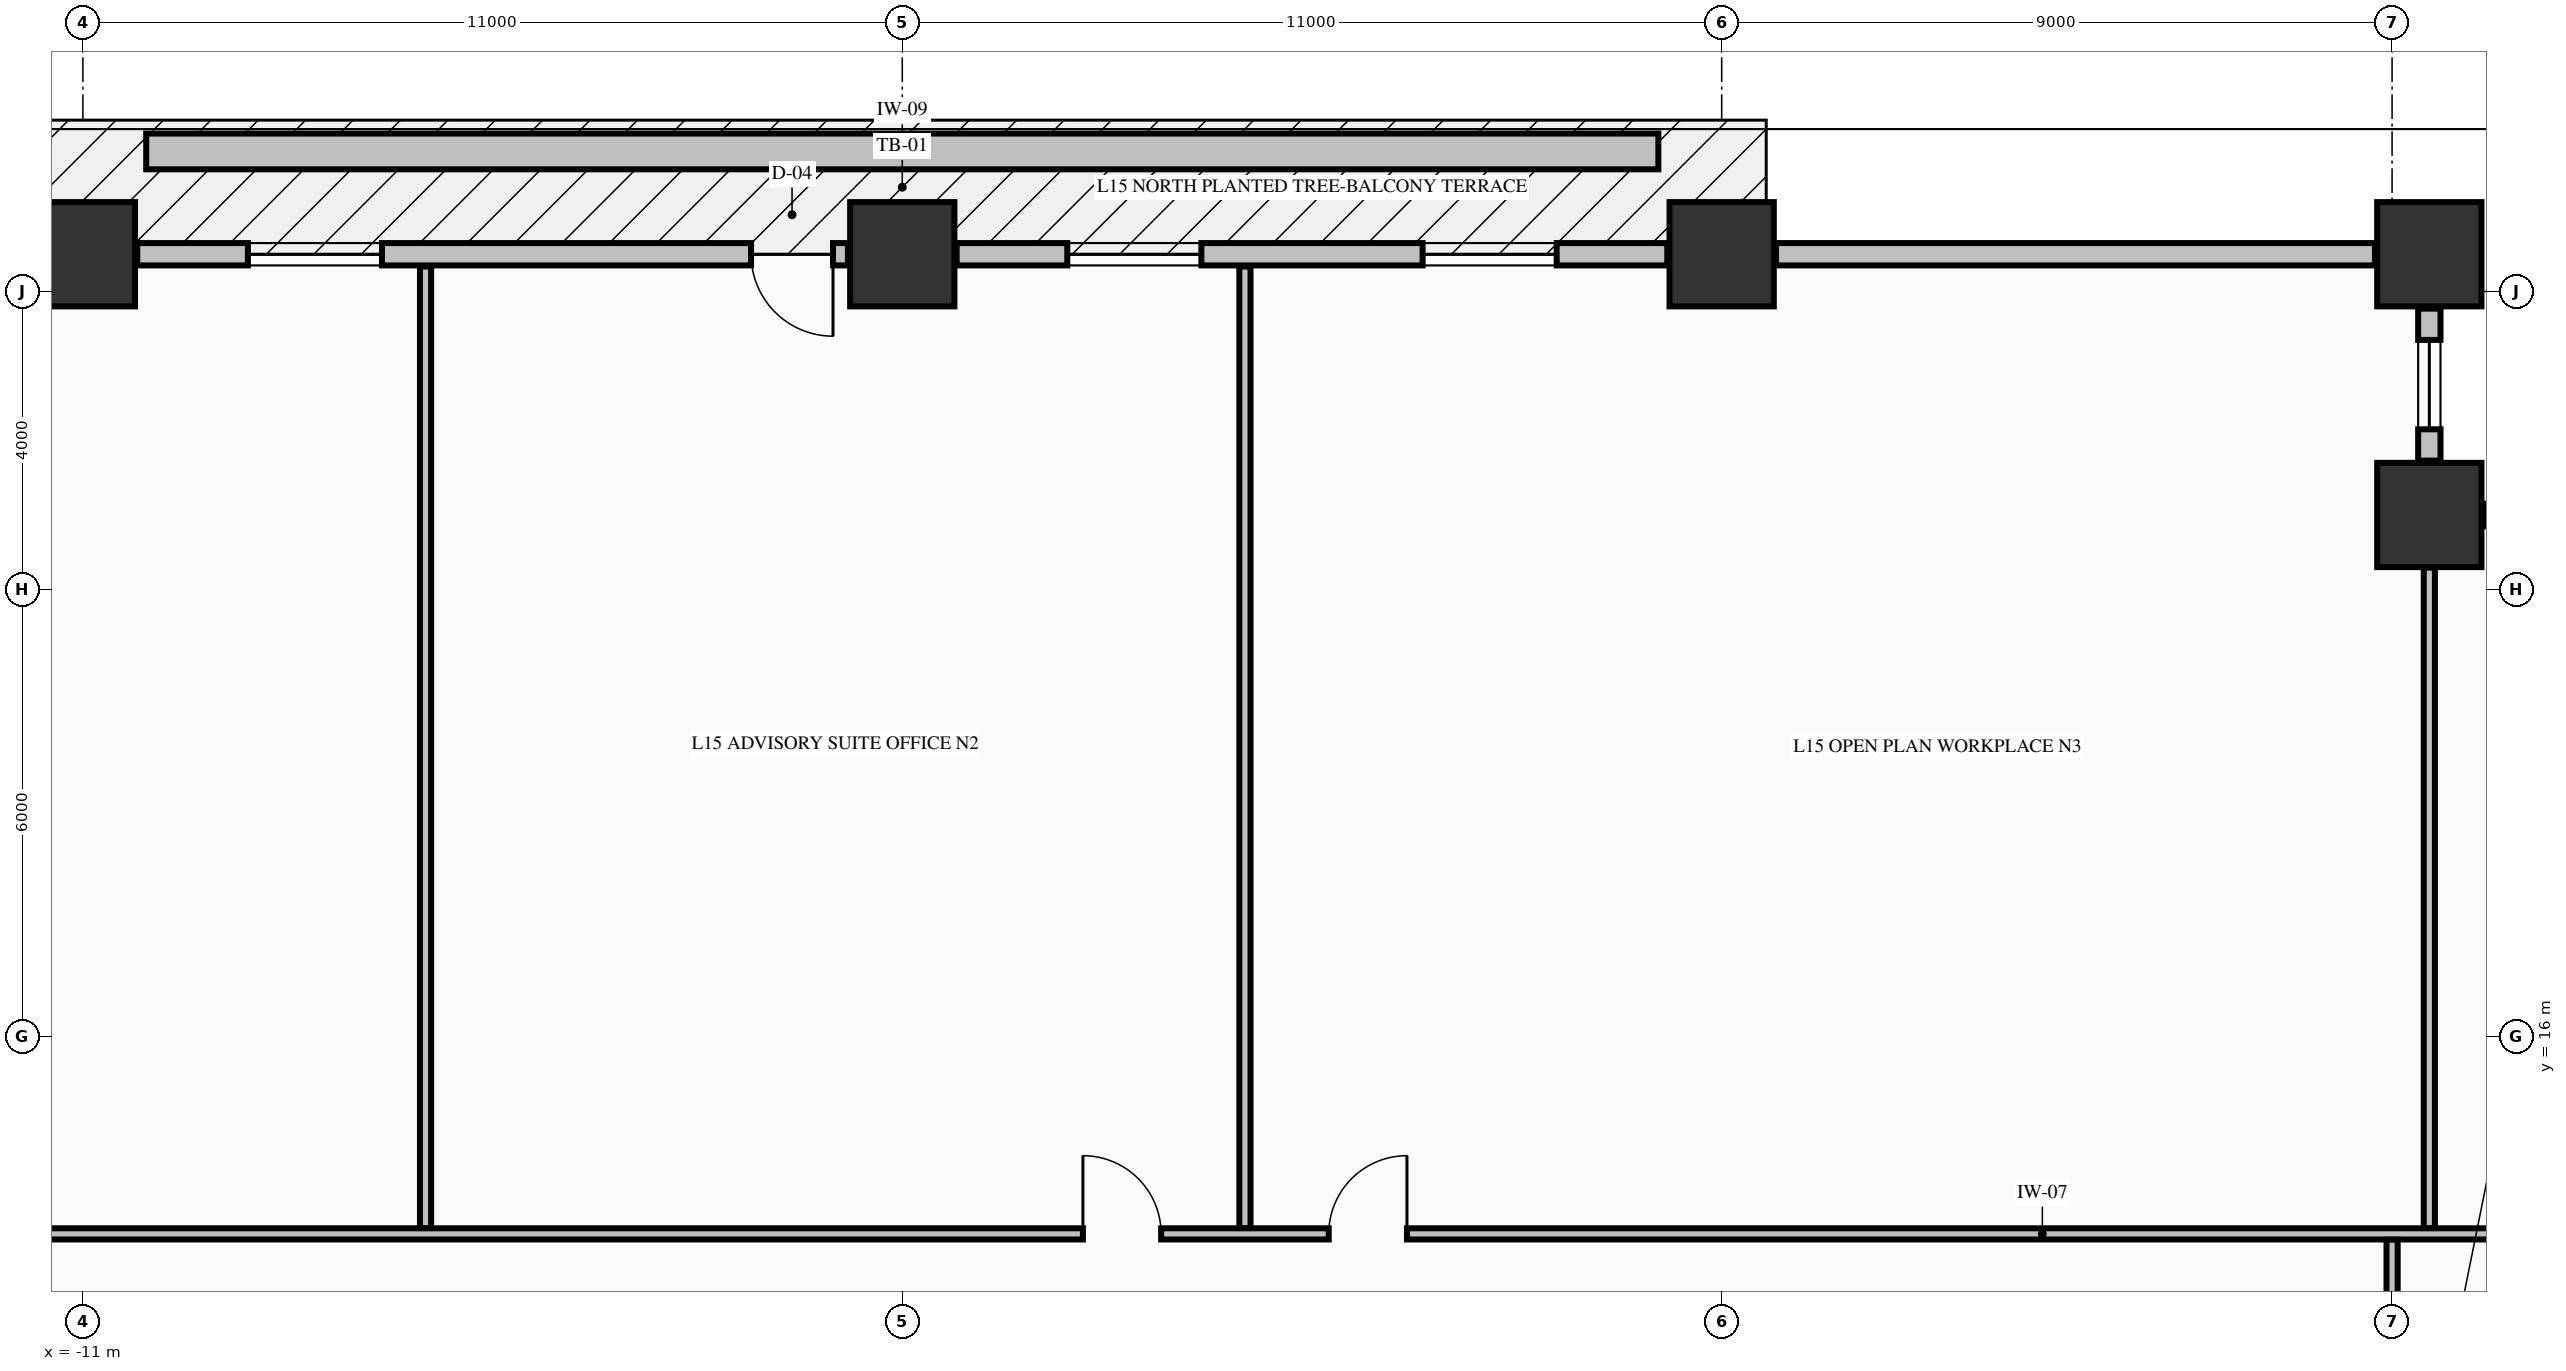
"""IFC4 building model, lengths in metres.
Left out: names, types, materials, properties, quantities, classifications, styles, units other than length and angle.
Written with IfcOpenShell. Run it as: python <this file> out.ifc"""

import sys

from ifc_helpers import new_model, si_unit, direction, frame, frame_2d, origin, origin_2d, place, context, subcontext, project, spatial, rectangle, extrude, element, fill, save


model = new_model("IFC4")
c1 = context("Model", 3, precision=1e-05, world=origin(), true_north=direction((0.0, 1.0)))
c2 = subcontext(c1, "Body", "Model", "MODEL_VIEW")
j1 = project(units=[si_unit("LENGTHUNIT", "METRE"), si_unit("PLANEANGLEUNIT", "RADIAN")], contexts=[c1])
p1 = place(None, origin())
s1 = spatial("IfcSite", under=j1, at=p1, CompositionType="ELEMENT")
p2 = place(p1, origin())
s2 = spatial("IfcBuilding", under=s1, at=p2, CompositionType="ELEMENT")
p3 = place(p2, frame((0.0, 0.0, 64.33)))
s3 = spatial("IfcBuildingStorey", under=s2, at=p3, CompositionType="ELEMENT", Elevation=64.33)
for number, where, z_axis, x_axis in (
    (1, (-11.0, 26.5, -0.25), (0.0, 0.0, 1.0), (1.0, 0.0, 0.0)),
    (2, (0.0, 26.5, -0.25), (0.0, 0.0, 1.0), (1.0, 0.0, 0.0)),
    (3, (11.0, 26.5, -0.25), (0.0, 0.0, 1.0), (1.0, 0.0, 0.0)),
    (4, (20.5, 26.5, -0.25), (0.0, 0.0, 1.0), (1.0, 0.0, 0.0)),
    (5, (20.5, 23.0, -0.25), (0.0, 0.0, 1.0), (1.0, 0.0, 0.0)),
):
    element("IfcColumn", number, at=place(p3, frame(where, z_axis=z_axis, x_axis=x_axis)), inside=s3, PredefinedType="COLUMN", context=c2, shape_type="SweptSolid", body=[
        extrude(rectangle(XDim=1.4, YDim=1.4, at=origin_2d()), origin(), (0.0, 0.0, 1.0), 3.57),
    ])
p4 = place(p3, frame((23.27, 23.0, 0.0), z_axis=(0.0, 0.0, 1.0), x_axis=(-1.0, 0.0, 0.0)))
e6 = element("IfcWall", 6, at=p4, inside=s3, PredefinedType="STANDARD", context=c2, shape_type="SweptSolid", body=[
    extrude(rectangle(XDim=2.04, YDim=0.3, at=frame_2d((1.02, 0.0))), origin(), (0.0, 0.0, 1.0), 2.712),
])
p5 = place(p4, frame((0.42, 0.0, 0.82)))
e7 = element("IfcOpeningElement", 7, at=p5, cuts=e6, PredefinedType="OPENING", context=c2, shape_type="SweptSolid", body=[
    extrude(rectangle(XDim=1.2, YDim=1.65, at=frame_2d((0.6, 0.825))), frame((0.0, 0.16, 0.0), z_axis=(0.0, -1.0, 0.0), x_axis=(1.0, 0.0, 0.0)), (0.0, 0.0, 1.0), 0.32),
])
p6 = place(p3, frame((20.5, 23.73, 0.0), z_axis=(0.0, 0.0, 1.0), x_axis=(0.0, 1.0, 0.0)))
e8 = element("IfcWall", 8, at=p6, inside=s3, PredefinedType="STANDARD", context=c2, shape_type="SweptSolid", body=[
    extrude(rectangle(XDim=2.04, YDim=0.3, at=frame_2d((1.02, 0.0))), origin(), (0.0, 0.0, 1.0), 2.712),
])
p7 = place(p6, frame((0.42, 0.0, 0.82)))
e9 = element("IfcOpeningElement", 9, at=p7, cuts=e8, PredefinedType="OPENING", context=c2, shape_type="SweptSolid", body=[
    extrude(rectangle(XDim=1.2, YDim=1.65, at=frame_2d((0.6, 0.825))), frame((0.0, 0.16, 0.0), z_axis=(0.0, -1.0, 0.0), x_axis=(1.0, 0.0, 0.0)), (0.0, 0.0, 1.0), 0.32),
])
p8 = place(p3, frame((-0.73, 26.5, 0.0), z_axis=(0.0, 0.0, 1.0), x_axis=(-1.0, 0.0, 0.0)))
e10 = element("IfcWall", 10, at=p8, inside=s3, PredefinedType="STANDARD", context=c2, shape_type="SweptSolid", body=[
    extrude(rectangle(XDim=9.54, YDim=0.3, at=frame_2d((4.77, 0.0))), origin(), (0.0, 0.0, 1.0), 2.712),
])
p9 = place(p8, frame((0.2, 0.0, 0.0)))
e11 = element("IfcOpeningElement", 11, at=p9, cuts=e10, PredefinedType="OPENING", context=c2, shape_type="SweptSolid", body=[
    extrude(rectangle(XDim=1.1, YDim=2.15, at=frame_2d((0.55, 1.075))), frame((0.0, 0.16, 0.0), z_axis=(0.0, -1.0, 0.0), x_axis=(1.0, 0.0, 0.0)), (0.0, 0.0, 1.0), 0.32),
])
p10 = place(p8, frame((6.255, 0.0, 0.78)))
e12 = element("IfcOpeningElement", 12, at=p10, cuts=e10, PredefinedType="OPENING", context=c2, shape_type="SweptSolid", body=[
    extrude(rectangle(XDim=1.8, YDim=1.72, at=frame_2d((0.9, 0.86))), frame((0.0, 0.16, 0.0), z_axis=(0.0, -1.0, 0.0), x_axis=(1.0, 0.0, 0.0)), (0.0, 0.0, 1.0), 0.32),
])
p11 = place(p3, frame((10.27, 26.5, 0.0), z_axis=(0.0, 0.0, 1.0), x_axis=(-1.0, 0.0, 0.0)))
e13 = element("IfcWall", 13, at=p11, inside=s3, PredefinedType="STANDARD", context=c2, shape_type="SweptSolid", body=[
    extrude(rectangle(XDim=9.54, YDim=0.3, at=frame_2d((4.77, 0.0))), origin(), (0.0, 0.0, 1.0), 2.712),
])
p12 = place(p11, frame((1.485, 0.0, 0.78)))
e14 = element("IfcOpeningElement", 14, at=p12, cuts=e13, PredefinedType="OPENING", context=c2, shape_type="SweptSolid", body=[
    extrude(rectangle(XDim=1.8, YDim=1.72, at=frame_2d((0.9, 0.86))), frame((0.0, 0.16, 0.0), z_axis=(0.0, -1.0, 0.0), x_axis=(1.0, 0.0, 0.0)), (0.0, 0.0, 1.0), 0.32),
])
p13 = place(p11, frame((6.255, 0.0, 0.78)))
e15 = element("IfcOpeningElement", 15, at=p13, cuts=e13, PredefinedType="OPENING", context=c2, shape_type="SweptSolid", body=[
    extrude(rectangle(XDim=1.8, YDim=1.72, at=frame_2d((0.9, 0.86))), frame((0.0, 0.16, 0.0), z_axis=(0.0, -1.0, 0.0), x_axis=(1.0, 0.0, 0.0)), (0.0, 0.0, 1.0), 0.32),
])
p14 = place(p3, frame((19.77, 26.5, 0.0), z_axis=(0.0, 0.0, 1.0), x_axis=(-1.0, 0.0, 0.0)))
e16 = element("IfcWall", 16, at=p14, inside=s3, PredefinedType="STANDARD", context=c2, shape_type="SweptSolid", body=[
    extrude(rectangle(XDim=8.04, YDim=0.3, at=frame_2d((4.02, 0.0))), origin(), (0.0, 0.0, 1.0), 2.712),
])
p15 = place(p3, frame((-28.835, 13.35, 0.0), z_axis=(0.0, 0.0, 1.0), x_axis=(1.0, 0.0, 0.0)))
e17 = element("IfcWall", 17, at=p15, inside=s3, PredefinedType="PARTITIONING", context=c2, shape_type="SweptSolid", body=[
    extrude(rectangle(XDim=52.67, YDim=0.15, at=frame_2d((26.335, 0.0))), origin(), (0.0, 0.0, 1.0), 3.32),
])
p16 = place(p15, frame((15.21, 0.0, 0.0)))
e18 = element("IfcOpeningElement", 18, at=p16, cuts=e17, PredefinedType="OPENING", context=c2, shape_type="SweptSolid", body=[
    extrude(rectangle(XDim=1.05, YDim=2.15, at=frame_2d((0.525, 1.075))), frame((0.0, 0.085, 0.0), z_axis=(0.0, -1.0, 0.0), x_axis=(1.0, 0.0, 0.0)), (0.0, 0.0, 1.0), 0.17),
])
p17 = place(p15, frame((31.26, 0.0, 0.0)))
e19 = element("IfcOpeningElement", 19, at=p17, cuts=e17, PredefinedType="OPENING", context=c2, shape_type="SweptSolid", body=[
    extrude(rectangle(XDim=1.05, YDim=2.15, at=frame_2d((0.525, 1.075))), frame((0.0, 0.085, 0.0), z_axis=(0.0, -1.0, 0.0), x_axis=(1.0, 0.0, 0.0)), (0.0, 0.0, 1.0), 0.17),
])
p18 = place(p15, frame((34.56, 0.0, 0.0)))
e20 = element("IfcOpeningElement", 20, at=p18, cuts=e17, PredefinedType="OPENING", context=c2, shape_type="SweptSolid", body=[
    extrude(rectangle(XDim=1.05, YDim=2.15, at=frame_2d((0.525, 1.075))), frame((0.0, 0.085, 0.0), z_axis=(0.0, -1.0, 0.0), x_axis=(1.0, 0.0, 0.0)), (0.0, 0.0, 1.0), 0.17),
])
for number, where, z_axis, x_axis in (
    (21, (-6.4, 13.428, 0.0), (0.0, 0.0, 1.0), (0.0, 1.0, 0.0)),
    (22, (4.6, 13.428, 0.0), (0.0, 0.0, 1.0), (0.0, 1.0, 0.0)),
):
    element("IfcWall", number, at=place(p3, frame(where, z_axis=z_axis, x_axis=x_axis)), inside=s3, PredefinedType="PARTITIONING", context=c2, shape_type="SweptSolid", body=[
        extrude(rectangle(XDim=12.907, YDim=0.15, at=frame_2d((6.454, 0.0))), origin(), (0.0, 0.0, 1.0), 3.32),
    ])
p19 = place(p3, frame((20.0, 11.106, 0.0), z_axis=(0.0, 0.0, 1.0), x_axis=(0.0, 1.0, 0.0)))
e23 = element("IfcWall", 23, at=p19, inside=s3, PredefinedType="PARTITIONING", context=c2, shape_type="SweptSolid", body=[
    extrude(rectangle(XDim=2.166, YDim=0.15, at=frame_2d((1.083, 0.0))), origin(), (0.0, 0.0, 1.0), 3.32),
])
p20 = place(p19, frame((0.349, 0.0, 0.0)))
e24 = element("IfcOpeningElement", 24, at=p20, cuts=e23, PredefinedType="OPENING", context=c2, shape_type="SweptSolid", body=[
    extrude(rectangle(XDim=0.95, YDim=2.15, at=frame_2d((0.475, 1.075))), frame((0.0, 0.085, 0.0), z_axis=(0.0, -1.0, 0.0), x_axis=(1.0, 0.0, 0.0)), (0.0, 0.0, 1.0), 0.17),
])
p21 = place(p3, frame((20.5, 13.428, 0.0), z_axis=(0.0, 0.0, 1.0), x_axis=(0.0, 1.0, 0.0)))
e25 = element("IfcWall", 25, at=p21, inside=s3, PredefinedType="PARTITIONING", context=c2, shape_type="SweptSolid", body=[
    extrude(rectangle(XDim=8.866, YDim=0.15, at=frame_2d((4.433, 0.0))), origin(), (0.0, 0.0, 1.0), 3.32),
])
p22 = place(p3, frame((-10.15, 27.88, -0.04), z_axis=(0.0, 0.0, 1.0), x_axis=(1.0, 0.0, 0.0)))
e26 = element("IfcWall", 26, at=p22, inside=s3, PredefinedType="PARAPET", context=c2, shape_type="SweptSolid", body=[
    extrude(rectangle(XDim=20.3, YDim=0.48, at=frame_2d((10.15, 0.0))), origin(), (0.0, 0.0, 1.0), 0.52),
])
p23 = place(p7, origin())
e27 = element("IfcWindow", 27, at=p23, inside=s3, PartitioningType="SINGLE_PANEL", PredefinedType="WINDOW", context=c2, shape_type="SweptSolid", body=[
    extrude(rectangle(XDim=1.2, YDim=1.65, at=frame_2d((0.6, 0.825))), frame((0.0, 0.03, 0.0), z_axis=(0.0, -1.0, 0.0), x_axis=(1.0, 0.0, 0.0)), (0.0, 0.0, 1.0), 0.06),
])
fill(e9, e27)
p24 = place(p9, origin())
e28 = element("IfcDoor", 28, at=p24, inside=s3, OperationType="SINGLE_SWING_LEFT", PredefinedType="DOOR", context=c2, shape_type="SweptSolid", body=[
    extrude(rectangle(XDim=1.1, YDim=2.15, at=frame_2d((0.55, 1.075))), frame((0.0, 0.025, 0.0), z_axis=(0.0, -1.0, 0.0), x_axis=(1.0, 0.0, 0.0)), (0.0, 0.0, 1.0), 0.05),
])
fill(e11, e28)
p25 = place(p10, origin())
e29 = element("IfcWindow", 29, at=p25, inside=s3, PartitioningType="SINGLE_PANEL", PredefinedType="WINDOW", context=c2, shape_type="SweptSolid", body=[
    extrude(rectangle(XDim=1.8, YDim=1.72, at=frame_2d((0.9, 0.86))), frame((0.0, 0.03, 0.0), z_axis=(0.0, -1.0, 0.0), x_axis=(1.0, 0.0, 0.0)), (0.0, 0.0, 1.0), 0.06),
])
fill(e12, e29)
p26 = place(p12, origin())
e30 = element("IfcWindow", 30, at=p26, inside=s3, PartitioningType="SINGLE_PANEL", PredefinedType="WINDOW", context=c2, shape_type="SweptSolid", body=[
    extrude(rectangle(XDim=1.8, YDim=1.72, at=frame_2d((0.9, 0.86))), frame((0.0, 0.03, 0.0), z_axis=(0.0, -1.0, 0.0), x_axis=(1.0, 0.0, 0.0)), (0.0, 0.0, 1.0), 0.06),
])
fill(e14, e30)
p27 = place(p13, origin())
e31 = element("IfcWindow", 31, at=p27, inside=s3, PartitioningType="SINGLE_PANEL", PredefinedType="WINDOW", context=c2, shape_type="SweptSolid", body=[
    extrude(rectangle(XDim=1.8, YDim=1.72, at=frame_2d((0.9, 0.86))), frame((0.0, 0.03, 0.0), z_axis=(0.0, -1.0, 0.0), x_axis=(1.0, 0.0, 0.0)), (0.0, 0.0, 1.0), 0.06),
])
fill(e15, e31)
p28 = place(p17, origin())
e32 = element("IfcDoor", 32, at=p28, inside=s3, OperationType="SINGLE_SWING_LEFT", PredefinedType="DOOR", context=c2, shape_type="SweptSolid", body=[
    extrude(rectangle(XDim=1.05, YDim=2.15, at=frame_2d((0.525, 1.075))), frame((0.0, 0.025, 0.0), z_axis=(0.0, -1.0, 0.0), x_axis=(1.0, 0.0, 0.0)), (0.0, 0.0, 1.0), 0.05),
])
fill(e19, e32)
p29 = place(p18, origin())
e33 = element("IfcDoor", 33, at=p29, inside=s3, OperationType="SINGLE_SWING_RIGHT", PredefinedType="DOOR", context=c2, shape_type="SweptSolid", body=[
    extrude(rectangle(XDim=1.05, YDim=2.15, at=frame_2d((0.525, 1.075))), frame((0.0, 0.025, 0.0), z_axis=(0.0, -1.0, 0.0), x_axis=(1.0, 0.0, 0.0)), (0.0, 0.0, 1.0), 0.05),
])
fill(e20, e33)
save(model, sys.argv[1])
